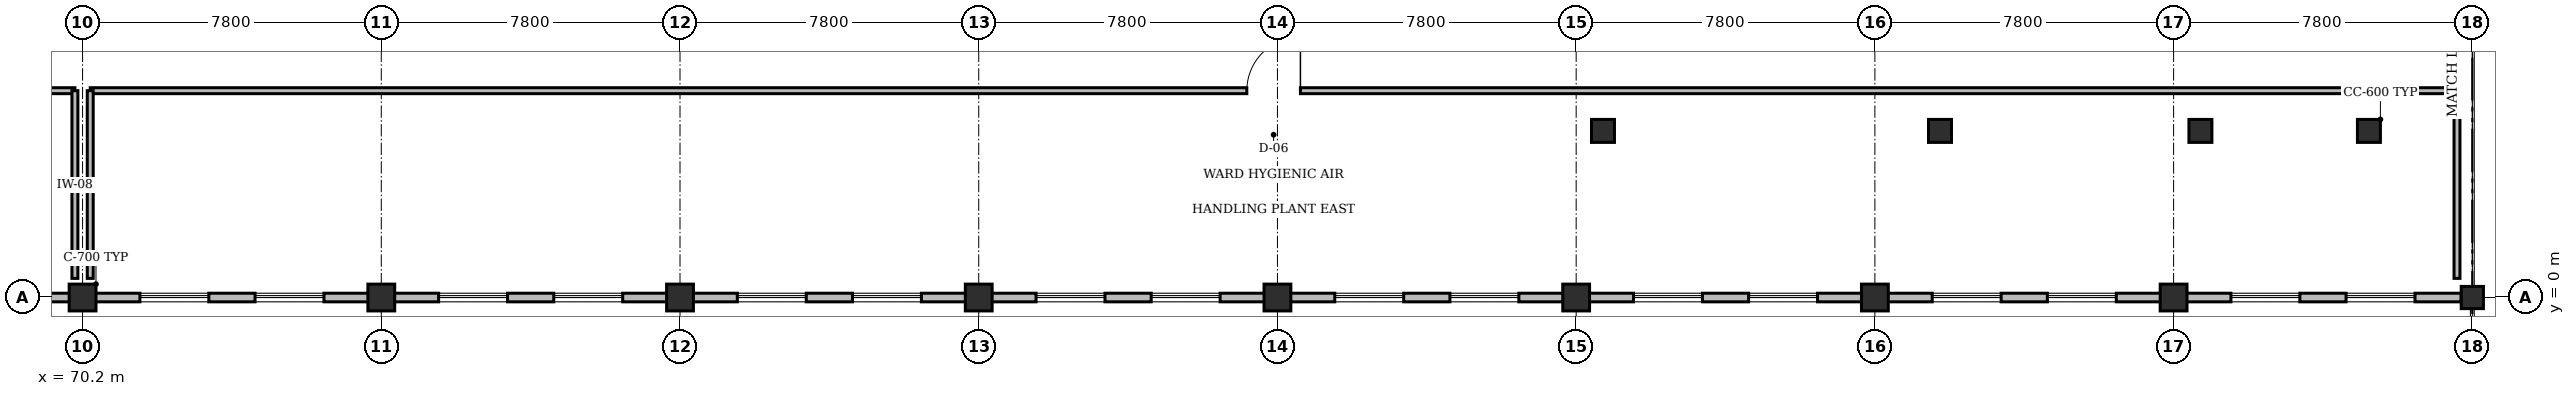
"""IFC4 building model, lengths in metres.
Left out: names, types, materials, properties, quantities, classifications, styles, units other than length and angle.
Written with IfcOpenShell. Run it as: python <this file> out.ifc"""

import sys

from ifc_helpers import new_model, si_unit, direction, frame, frame_2d, origin, origin_2d, place, context, subcontext, project, spatial, rectangle, circle, extrude, element, fill, save


model = new_model("IFC4")
c1 = context("Model", 3, precision=1e-05, world=origin(), true_north=direction((0.0, 1.0)))
c2 = subcontext(c1, "Body", "Model", "MODEL_VIEW")
j1 = project(units=[si_unit("LENGTHUNIT", "METRE"), si_unit("PLANEANGLEUNIT", "RADIAN")], contexts=[c1])
p1 = place(None, origin())
s1 = spatial("IfcSite", under=j1, at=p1, CompositionType="ELEMENT")
p2 = place(p1, origin())
s2 = spatial("IfcBuilding", under=s1, at=p2, CompositionType="ELEMENT")
p3 = place(p2, frame((0.0, 0.0, 14.4)))
s3 = spatial("IfcBuildingStorey", under=s2, at=p3, CompositionType="ELEMENT", Elevation=14.4)
for number, where, z_axis, x_axis in (
    (1, (70.2, 0.0, 0.0), (0.0, 0.0, 1.0), (1.0, 0.0, 0.0)),
    (2, (78.0, 0.0, 0.0), (0.0, 0.0, 1.0), (1.0, 0.0, 0.0)),
    (3, (85.8, 0.0, 0.0), (0.0, 0.0, 1.0), (1.0, 0.0, 0.0)),
    (4, (93.6, 0.0, 0.0), (0.0, 0.0, 1.0), (1.0, 0.0, 0.0)),
    (5, (101.4, 0.0, 0.0), (0.0, 0.0, 1.0), (1.0, 0.0, 0.0)),
    (6, (109.2, 0.0, 0.0), (0.0, 0.0, 1.0), (1.0, 0.0, 0.0)),
    (7, (117.0, 0.0, 0.0), (0.0, 0.0, 1.0), (1.0, 0.0, 0.0)),
    (8, (124.8, 0.0, 0.0), (0.0, 0.0, 1.0), (1.0, 0.0, 0.0)),
):
    element("IfcColumn", number, at=place(p3, frame(where, z_axis=z_axis, x_axis=x_axis)), inside=s3, PredefinedType="COLUMN", context=c2, shape_type="SweptSolid", body=[
        extrude(rectangle(XDim=0.7, YDim=0.7, at=origin_2d()), origin(), (0.0, 0.0, 1.0), 3.6),
    ])
p4 = place(p3, frame((132.6, 0.0, 0.0), z_axis=(0.0, 0.0, 1.0), x_axis=(1.0, 0.0, 0.0)))
e9 = element("IfcColumn", 9, at=p4, inside=s3, PredefinedType="COLUMN", context=c2, shape_type="SweptSolid", body=[
    extrude(rectangle(XDim=0.58, YDim=0.58, at=origin_2d()), origin(), (0.0, 0.0, 1.0), 3.6),
])
for number, where, z_axis, x_axis in (
    (10, (129.9, 4.35, 0.0), (0.0, 0.0, 1.0), (1.0, 0.0, 0.0)),
    (11, (125.5, 4.35, 0.0), (0.0, 0.0, 1.0), (1.0, 0.0, 0.0)),
    (12, (118.7, 4.35, 0.0), (0.0, 0.0, 1.0), (1.0, 0.0, 0.0)),
    (13, (109.9, 4.35, 0.0), (0.0, 0.0, 1.0), (1.0, 0.0, 0.0)),
):
    element("IfcColumn", number, at=place(p3, frame(where, z_axis=z_axis, x_axis=x_axis)), inside=s3, PredefinedType="PILASTER", context=c2, shape_type="SweptSolid", body=[
        extrude(circle(Radius=0.3, at=origin_2d()), origin(), (0.0, 0.0, 1.0), 3.6),
    ])
p5 = place(p3, frame((69.91, 0.0, 0.0), z_axis=(0.0, 0.0, 1.0), x_axis=(-1.0, 0.0, 0.0)))
e14 = element("IfcWall", 14, at=p5, inside=s3, PredefinedType="STANDARD", context=c2, shape_type="SweptSolid", body=[
    extrude(rectangle(XDim=7.22, YDim=0.225, at=frame_2d((3.61, 0.0))), origin(), (0.0, 0.0, 1.0), 2.205),
])
p6 = place(p5, frame((1.207, 0.0, 0.9)))
e15 = element("IfcOpeningElement", 15, at=p6, cuts=e14, PredefinedType="OPENING", context=c2, shape_type="SweptSolid", body=[
    extrude(rectangle(XDim=1.8, YDim=1.05, at=frame_2d((0.9, 0.525))), frame((0.0, 0.123, 0.0), z_axis=(0.0, -1.0, 0.0), x_axis=(1.0, 0.0, 0.0)), (0.0, 0.0, 1.0), 0.245),
])
p7 = place(p5, frame((4.213, 0.0, 0.9)))
e16 = element("IfcOpeningElement", 16, at=p7, cuts=e14, PredefinedType="OPENING", context=c2, shape_type="SweptSolid", body=[
    extrude(rectangle(XDim=1.8, YDim=1.05, at=frame_2d((0.9, 0.525))), frame((0.0, 0.123, 0.0), z_axis=(0.0, -1.0, 0.0), x_axis=(1.0, 0.0, 0.0)), (0.0, 0.0, 1.0), 0.245),
])
p8 = place(p3, frame((77.71, 0.0, 0.0), z_axis=(0.0, 0.0, 1.0), x_axis=(-1.0, 0.0, 0.0)))
e17 = element("IfcWall", 17, at=p8, inside=s3, PredefinedType="STANDARD", context=c2, shape_type="SweptSolid", body=[
    extrude(rectangle(XDim=7.22, YDim=0.225, at=frame_2d((3.61, 0.0))), origin(), (0.0, 0.0, 1.0), 2.205),
])
p9 = place(p8, frame((1.207, 0.0, 0.9)))
e18 = element("IfcOpeningElement", 18, at=p9, cuts=e17, PredefinedType="OPENING", context=c2, shape_type="SweptSolid", body=[
    extrude(rectangle(XDim=1.8, YDim=1.05, at=frame_2d((0.9, 0.525))), frame((0.0, 0.123, 0.0), z_axis=(0.0, -1.0, 0.0), x_axis=(1.0, 0.0, 0.0)), (0.0, 0.0, 1.0), 0.245),
])
p10 = place(p8, frame((4.213, 0.0, 0.9)))
e19 = element("IfcOpeningElement", 19, at=p10, cuts=e17, PredefinedType="OPENING", context=c2, shape_type="SweptSolid", body=[
    extrude(rectangle(XDim=1.8, YDim=1.05, at=frame_2d((0.9, 0.525))), frame((0.0, 0.123, 0.0), z_axis=(0.0, -1.0, 0.0), x_axis=(1.0, 0.0, 0.0)), (0.0, 0.0, 1.0), 0.245),
])
p11 = place(p3, frame((85.51, 0.0, 0.0), z_axis=(0.0, 0.0, 1.0), x_axis=(-1.0, 0.0, 0.0)))
e20 = element("IfcWall", 20, at=p11, inside=s3, PredefinedType="STANDARD", context=c2, shape_type="SweptSolid", body=[
    extrude(rectangle(XDim=7.22, YDim=0.225, at=frame_2d((3.61, 0.0))), origin(), (0.0, 0.0, 1.0), 2.205),
])
p12 = place(p11, frame((1.207, 0.0, 0.9)))
e21 = element("IfcOpeningElement", 21, at=p12, cuts=e20, PredefinedType="OPENING", context=c2, shape_type="SweptSolid", body=[
    extrude(rectangle(XDim=1.8, YDim=1.05, at=frame_2d((0.9, 0.525))), frame((0.0, 0.123, 0.0), z_axis=(0.0, -1.0, 0.0), x_axis=(1.0, 0.0, 0.0)), (0.0, 0.0, 1.0), 0.245),
])
p13 = place(p11, frame((4.213, 0.0, 0.9)))
e22 = element("IfcOpeningElement", 22, at=p13, cuts=e20, PredefinedType="OPENING", context=c2, shape_type="SweptSolid", body=[
    extrude(rectangle(XDim=1.8, YDim=1.05, at=frame_2d((0.9, 0.525))), frame((0.0, 0.123, 0.0), z_axis=(0.0, -1.0, 0.0), x_axis=(1.0, 0.0, 0.0)), (0.0, 0.0, 1.0), 0.245),
])
p14 = place(p3, frame((93.31, 0.0, 0.0), z_axis=(0.0, 0.0, 1.0), x_axis=(-1.0, 0.0, 0.0)))
e23 = element("IfcWall", 23, at=p14, inside=s3, PredefinedType="STANDARD", context=c2, shape_type="SweptSolid", body=[
    extrude(rectangle(XDim=7.22, YDim=0.225, at=frame_2d((3.61, 0.0))), origin(), (0.0, 0.0, 1.0), 2.205),
])
p15 = place(p14, frame((1.207, 0.0, 0.9)))
e24 = element("IfcOpeningElement", 24, at=p15, cuts=e23, PredefinedType="OPENING", context=c2, shape_type="SweptSolid", body=[
    extrude(rectangle(XDim=1.8, YDim=1.05, at=frame_2d((0.9, 0.525))), frame((0.0, 0.123, 0.0), z_axis=(0.0, -1.0, 0.0), x_axis=(1.0, 0.0, 0.0)), (0.0, 0.0, 1.0), 0.245),
])
p16 = place(p14, frame((4.213, 0.0, 0.9)))
e25 = element("IfcOpeningElement", 25, at=p16, cuts=e23, PredefinedType="OPENING", context=c2, shape_type="SweptSolid", body=[
    extrude(rectangle(XDim=1.8, YDim=1.05, at=frame_2d((0.9, 0.525))), frame((0.0, 0.123, 0.0), z_axis=(0.0, -1.0, 0.0), x_axis=(1.0, 0.0, 0.0)), (0.0, 0.0, 1.0), 0.245),
])
p17 = place(p3, frame((101.11, 0.0, 0.0), z_axis=(0.0, 0.0, 1.0), x_axis=(-1.0, 0.0, 0.0)))
e26 = element("IfcWall", 26, at=p17, inside=s3, PredefinedType="STANDARD", context=c2, shape_type="SweptSolid", body=[
    extrude(rectangle(XDim=7.22, YDim=0.225, at=frame_2d((3.61, 0.0))), origin(), (0.0, 0.0, 1.0), 2.205),
])
p18 = place(p17, frame((1.207, 0.0, 0.9)))
e27 = element("IfcOpeningElement", 27, at=p18, cuts=e26, PredefinedType="OPENING", context=c2, shape_type="SweptSolid", body=[
    extrude(rectangle(XDim=1.8, YDim=1.05, at=frame_2d((0.9, 0.525))), frame((0.0, 0.123, 0.0), z_axis=(0.0, -1.0, 0.0), x_axis=(1.0, 0.0, 0.0)), (0.0, 0.0, 1.0), 0.245),
])
p19 = place(p17, frame((4.213, 0.0, 0.9)))
e28 = element("IfcOpeningElement", 28, at=p19, cuts=e26, PredefinedType="OPENING", context=c2, shape_type="SweptSolid", body=[
    extrude(rectangle(XDim=1.8, YDim=1.05, at=frame_2d((0.9, 0.525))), frame((0.0, 0.123, 0.0), z_axis=(0.0, -1.0, 0.0), x_axis=(1.0, 0.0, 0.0)), (0.0, 0.0, 1.0), 0.245),
])
p20 = place(p3, frame((108.91, 0.0, 0.0), z_axis=(0.0, 0.0, 1.0), x_axis=(-1.0, 0.0, 0.0)))
e29 = element("IfcWall", 29, at=p20, inside=s3, PredefinedType="STANDARD", context=c2, shape_type="SweptSolid", body=[
    extrude(rectangle(XDim=7.22, YDim=0.225, at=frame_2d((3.61, 0.0))), origin(), (0.0, 0.0, 1.0), 2.205),
])
p21 = place(p20, frame((1.207, 0.0, 0.9)))
e30 = element("IfcOpeningElement", 30, at=p21, cuts=e29, PredefinedType="OPENING", context=c2, shape_type="SweptSolid", body=[
    extrude(rectangle(XDim=1.8, YDim=1.05, at=frame_2d((0.9, 0.525))), frame((0.0, 0.123, 0.0), z_axis=(0.0, -1.0, 0.0), x_axis=(1.0, 0.0, 0.0)), (0.0, 0.0, 1.0), 0.245),
])
p22 = place(p20, frame((4.213, 0.0, 0.9)))
e31 = element("IfcOpeningElement", 31, at=p22, cuts=e29, PredefinedType="OPENING", context=c2, shape_type="SweptSolid", body=[
    extrude(rectangle(XDim=1.8, YDim=1.05, at=frame_2d((0.9, 0.525))), frame((0.0, 0.123, 0.0), z_axis=(0.0, -1.0, 0.0), x_axis=(1.0, 0.0, 0.0)), (0.0, 0.0, 1.0), 0.245),
])
p23 = place(p3, frame((116.71, 0.0, 0.0), z_axis=(0.0, 0.0, 1.0), x_axis=(-1.0, 0.0, 0.0)))
e32 = element("IfcWall", 32, at=p23, inside=s3, PredefinedType="STANDARD", context=c2, shape_type="SweptSolid", body=[
    extrude(rectangle(XDim=7.22, YDim=0.225, at=frame_2d((3.61, 0.0))), origin(), (0.0, 0.0, 1.0), 2.205),
])
p24 = place(p23, frame((1.207, 0.0, 0.9)))
e33 = element("IfcOpeningElement", 33, at=p24, cuts=e32, PredefinedType="OPENING", context=c2, shape_type="SweptSolid", body=[
    extrude(rectangle(XDim=1.8, YDim=1.05, at=frame_2d((0.9, 0.525))), frame((0.0, 0.123, 0.0), z_axis=(0.0, -1.0, 0.0), x_axis=(1.0, 0.0, 0.0)), (0.0, 0.0, 1.0), 0.245),
])
p25 = place(p23, frame((4.213, 0.0, 0.9)))
e34 = element("IfcOpeningElement", 34, at=p25, cuts=e32, PredefinedType="OPENING", context=c2, shape_type="SweptSolid", body=[
    extrude(rectangle(XDim=1.8, YDim=1.05, at=frame_2d((0.9, 0.525))), frame((0.0, 0.123, 0.0), z_axis=(0.0, -1.0, 0.0), x_axis=(1.0, 0.0, 0.0)), (0.0, 0.0, 1.0), 0.245),
])
p26 = place(p3, frame((124.51, 0.0, 0.0), z_axis=(0.0, 0.0, 1.0), x_axis=(-1.0, 0.0, 0.0)))
e35 = element("IfcWall", 35, at=p26, inside=s3, PredefinedType="STANDARD", context=c2, shape_type="SweptSolid", body=[
    extrude(rectangle(XDim=7.22, YDim=0.225, at=frame_2d((3.61, 0.0))), origin(), (0.0, 0.0, 1.0), 2.205),
])
p27 = place(p26, frame((1.207, 0.0, 0.9)))
e36 = element("IfcOpeningElement", 36, at=p27, cuts=e35, PredefinedType="OPENING", context=c2, shape_type="SweptSolid", body=[
    extrude(rectangle(XDim=1.8, YDim=1.05, at=frame_2d((0.9, 0.525))), frame((0.0, 0.123, 0.0), z_axis=(0.0, -1.0, 0.0), x_axis=(1.0, 0.0, 0.0)), (0.0, 0.0, 1.0), 0.245),
])
p28 = place(p26, frame((4.213, 0.0, 0.9)))
e37 = element("IfcOpeningElement", 37, at=p28, cuts=e35, PredefinedType="OPENING", context=c2, shape_type="SweptSolid", body=[
    extrude(rectangle(XDim=1.8, YDim=1.05, at=frame_2d((0.9, 0.525))), frame((0.0, 0.123, 0.0), z_axis=(0.0, -1.0, 0.0), x_axis=(1.0, 0.0, 0.0)), (0.0, 0.0, 1.0), 0.245),
])
p29 = place(p3, frame((132.31, 0.0, 0.0), z_axis=(0.0, 0.0, 1.0), x_axis=(-1.0, 0.0, 0.0)))
e38 = element("IfcWall", 38, at=p29, inside=s3, PredefinedType="STANDARD", context=c2, shape_type="SweptSolid", body=[
    extrude(rectangle(XDim=7.22, YDim=0.225, at=frame_2d((3.61, 0.0))), origin(), (0.0, 0.0, 1.0), 2.205),
])
p30 = place(p29, frame((1.207, 0.0, 0.9)))
e39 = element("IfcOpeningElement", 39, at=p30, cuts=e38, PredefinedType="OPENING", context=c2, shape_type="SweptSolid", body=[
    extrude(rectangle(XDim=1.8, YDim=1.05, at=frame_2d((0.9, 0.525))), frame((0.0, 0.123, 0.0), z_axis=(0.0, -1.0, 0.0), x_axis=(1.0, 0.0, 0.0)), (0.0, 0.0, 1.0), 0.245),
])
p31 = place(p29, frame((4.213, 0.0, 0.9)))
e40 = element("IfcOpeningElement", 40, at=p31, cuts=e38, PredefinedType="OPENING", context=c2, shape_type="SweptSolid", body=[
    extrude(rectangle(XDim=1.8, YDim=1.05, at=frame_2d((0.9, 0.525))), frame((0.0, 0.123, 0.0), z_axis=(0.0, -1.0, 0.0), x_axis=(1.0, 0.0, 0.0)), (0.0, 0.0, 1.0), 0.245),
])
p32 = place(p3, frame((16.0, 5.4, 0.0), z_axis=(0.0, 0.0, 1.0), x_axis=(1.0, 0.0, 0.0)))
e41 = element("IfcWall", 41, at=p32, inside=s3, PredefinedType="PARTITIONING", context=c2, shape_type="SweptSolid", body=[
    extrude(rectangle(XDim=54.0, YDim=0.155, at=frame_2d((27.0, 0.0))), origin(), (0.0, 0.0, 1.0), 3.3),
])
p33 = place(p32, frame((26.3, 0.0, 0.0)))
e42 = element("IfcOpeningElement", 42, at=p33, cuts=e41, PredefinedType="OPENING", context=c2, shape_type="SweptSolid", body=[
    extrude(rectangle(XDim=1.4, YDim=2.2, at=frame_2d((0.7, 1.1))), frame((0.0, 0.087, 0.0), z_axis=(0.0, -1.0, 0.0), x_axis=(1.0, 0.0, 0.0)), (0.0, 0.0, 1.0), 0.175),
])
p34 = place(p3, frame((70.0, 0.5, 0.0), z_axis=(0.0, 0.0, 1.0), x_axis=(0.0, 1.0, 0.0)))
e43 = element("IfcWall", 43, at=p34, inside=s3, PredefinedType="PARTITIONING", context=c2, shape_type="SweptSolid", body=[
    extrude(rectangle(XDim=4.9, YDim=0.155, at=frame_2d((2.45, 0.0))), origin(), (0.0, 0.0, 1.0), 2.605),
])
p35 = place(p3, frame((70.4, 5.4, 0.0), z_axis=(0.0, 0.0, 1.0), x_axis=(1.0, 0.0, 0.0)))
e44 = element("IfcWall", 44, at=p35, inside=s3, PredefinedType="PARTITIONING", context=c2, shape_type="SweptSolid", body=[
    extrude(rectangle(XDim=61.8, YDim=0.155, at=frame_2d((30.9, 0.0))), origin(), (0.0, 0.0, 1.0), 3.3),
])
p36 = place(p35, frame((30.2, 0.0, 0.0)))
e45 = element("IfcOpeningElement", 45, at=p36, cuts=e44, PredefinedType="OPENING", context=c2, shape_type="SweptSolid", body=[
    extrude(rectangle(XDim=1.4, YDim=2.2, at=frame_2d((0.7, 1.1))), frame((0.0, 0.087, 0.0), z_axis=(0.0, -1.0, 0.0), x_axis=(1.0, 0.0, 0.0)), (0.0, 0.0, 1.0), 0.175),
])
p37 = place(p3, frame((70.4, 0.5, 0.0), z_axis=(0.0, 0.0, 1.0), x_axis=(0.0, 1.0, 0.0)))
e46 = element("IfcWall", 46, at=p37, inside=s3, PredefinedType="PARTITIONING", context=c2, shape_type="SweptSolid", body=[
    extrude(rectangle(XDim=4.9, YDim=0.155, at=frame_2d((2.45, 0.0))), origin(), (0.0, 0.0, 1.0), 2.605),
])
p38 = place(p3, frame((132.2, 0.5, 0.0), z_axis=(0.0, 0.0, 1.0), x_axis=(0.0, 1.0, 0.0)))
e47 = element("IfcWall", 47, at=p38, inside=s3, PredefinedType="PARTITIONING", context=c2, shape_type="SweptSolid", body=[
    extrude(rectangle(XDim=4.9, YDim=0.155, at=frame_2d((2.45, 0.0))), origin(), (0.0, 0.0, 1.0), 2.62),
])
p39 = place(p9, origin())
e48 = element("IfcWindow", 48, at=p39, inside=s3, PartitioningType="SINGLE_PANEL", PredefinedType="WINDOW", context=c2, shape_type="SweptSolid", body=[
    extrude(rectangle(XDim=1.8, YDim=1.05, at=frame_2d((0.9, 0.525))), frame((0.0, 0.03, 0.0), z_axis=(0.0, -1.0, 0.0), x_axis=(1.0, 0.0, 0.0)), (0.0, 0.0, 1.0), 0.06),
])
fill(e18, e48)
p40 = place(p10, origin())
e49 = element("IfcWindow", 49, at=p40, inside=s3, PartitioningType="SINGLE_PANEL", PredefinedType="WINDOW", context=c2, shape_type="SweptSolid", body=[
    extrude(rectangle(XDim=1.8, YDim=1.05, at=frame_2d((0.9, 0.525))), frame((0.0, 0.03, 0.0), z_axis=(0.0, -1.0, 0.0), x_axis=(1.0, 0.0, 0.0)), (0.0, 0.0, 1.0), 0.06),
])
fill(e19, e49)
p41 = place(p12, origin())
e50 = element("IfcWindow", 50, at=p41, inside=s3, PartitioningType="SINGLE_PANEL", PredefinedType="WINDOW", context=c2, shape_type="SweptSolid", body=[
    extrude(rectangle(XDim=1.8, YDim=1.05, at=frame_2d((0.9, 0.525))), frame((0.0, 0.03, 0.0), z_axis=(0.0, -1.0, 0.0), x_axis=(1.0, 0.0, 0.0)), (0.0, 0.0, 1.0), 0.06),
])
fill(e21, e50)
p42 = place(p13, origin())
e51 = element("IfcWindow", 51, at=p42, inside=s3, PartitioningType="SINGLE_PANEL", PredefinedType="WINDOW", context=c2, shape_type="SweptSolid", body=[
    extrude(rectangle(XDim=1.8, YDim=1.05, at=frame_2d((0.9, 0.525))), frame((0.0, 0.03, 0.0), z_axis=(0.0, -1.0, 0.0), x_axis=(1.0, 0.0, 0.0)), (0.0, 0.0, 1.0), 0.06),
])
fill(e22, e51)
p43 = place(p15, origin())
e52 = element("IfcWindow", 52, at=p43, inside=s3, PartitioningType="SINGLE_PANEL", PredefinedType="WINDOW", context=c2, shape_type="SweptSolid", body=[
    extrude(rectangle(XDim=1.8, YDim=1.05, at=frame_2d((0.9, 0.525))), frame((0.0, 0.03, 0.0), z_axis=(0.0, -1.0, 0.0), x_axis=(1.0, 0.0, 0.0)), (0.0, 0.0, 1.0), 0.06),
])
fill(e24, e52)
p44 = place(p16, origin())
e53 = element("IfcWindow", 53, at=p44, inside=s3, PartitioningType="SINGLE_PANEL", PredefinedType="WINDOW", context=c2, shape_type="SweptSolid", body=[
    extrude(rectangle(XDim=1.8, YDim=1.05, at=frame_2d((0.9, 0.525))), frame((0.0, 0.03, 0.0), z_axis=(0.0, -1.0, 0.0), x_axis=(1.0, 0.0, 0.0)), (0.0, 0.0, 1.0), 0.06),
])
fill(e25, e53)
p45 = place(p18, origin())
e54 = element("IfcWindow", 54, at=p45, inside=s3, PartitioningType="SINGLE_PANEL", PredefinedType="WINDOW", context=c2, shape_type="SweptSolid", body=[
    extrude(rectangle(XDim=1.8, YDim=1.05, at=frame_2d((0.9, 0.525))), frame((0.0, 0.03, 0.0), z_axis=(0.0, -1.0, 0.0), x_axis=(1.0, 0.0, 0.0)), (0.0, 0.0, 1.0), 0.06),
])
fill(e27, e54)
p46 = place(p19, origin())
e55 = element("IfcWindow", 55, at=p46, inside=s3, PartitioningType="SINGLE_PANEL", PredefinedType="WINDOW", context=c2, shape_type="SweptSolid", body=[
    extrude(rectangle(XDim=1.8, YDim=1.05, at=frame_2d((0.9, 0.525))), frame((0.0, 0.03, 0.0), z_axis=(0.0, -1.0, 0.0), x_axis=(1.0, 0.0, 0.0)), (0.0, 0.0, 1.0), 0.06),
])
fill(e28, e55)
p47 = place(p21, origin())
e56 = element("IfcWindow", 56, at=p47, inside=s3, PartitioningType="SINGLE_PANEL", PredefinedType="WINDOW", context=c2, shape_type="SweptSolid", body=[
    extrude(rectangle(XDim=1.8, YDim=1.05, at=frame_2d((0.9, 0.525))), frame((0.0, 0.03, 0.0), z_axis=(0.0, -1.0, 0.0), x_axis=(1.0, 0.0, 0.0)), (0.0, 0.0, 1.0), 0.06),
])
fill(e30, e56)
p48 = place(p22, origin())
e57 = element("IfcWindow", 57, at=p48, inside=s3, PartitioningType="SINGLE_PANEL", PredefinedType="WINDOW", context=c2, shape_type="SweptSolid", body=[
    extrude(rectangle(XDim=1.8, YDim=1.05, at=frame_2d((0.9, 0.525))), frame((0.0, 0.03, 0.0), z_axis=(0.0, -1.0, 0.0), x_axis=(1.0, 0.0, 0.0)), (0.0, 0.0, 1.0), 0.06),
])
fill(e31, e57)
p49 = place(p24, origin())
e58 = element("IfcWindow", 58, at=p49, inside=s3, PartitioningType="SINGLE_PANEL", PredefinedType="WINDOW", context=c2, shape_type="SweptSolid", body=[
    extrude(rectangle(XDim=1.8, YDim=1.05, at=frame_2d((0.9, 0.525))), frame((0.0, 0.03, 0.0), z_axis=(0.0, -1.0, 0.0), x_axis=(1.0, 0.0, 0.0)), (0.0, 0.0, 1.0), 0.06),
])
fill(e33, e58)
p50 = place(p25, origin())
e59 = element("IfcWindow", 59, at=p50, inside=s3, PartitioningType="SINGLE_PANEL", PredefinedType="WINDOW", context=c2, shape_type="SweptSolid", body=[
    extrude(rectangle(XDim=1.8, YDim=1.05, at=frame_2d((0.9, 0.525))), frame((0.0, 0.03, 0.0), z_axis=(0.0, -1.0, 0.0), x_axis=(1.0, 0.0, 0.0)), (0.0, 0.0, 1.0), 0.06),
])
fill(e34, e59)
p51 = place(p27, origin())
e60 = element("IfcWindow", 60, at=p51, inside=s3, PartitioningType="SINGLE_PANEL", PredefinedType="WINDOW", context=c2, shape_type="SweptSolid", body=[
    extrude(rectangle(XDim=1.8, YDim=1.05, at=frame_2d((0.9, 0.525))), frame((0.0, 0.03, 0.0), z_axis=(0.0, -1.0, 0.0), x_axis=(1.0, 0.0, 0.0)), (0.0, 0.0, 1.0), 0.06),
])
fill(e36, e60)
p52 = place(p28, origin())
e61 = element("IfcWindow", 61, at=p52, inside=s3, PartitioningType="SINGLE_PANEL", PredefinedType="WINDOW", context=c2, shape_type="SweptSolid", body=[
    extrude(rectangle(XDim=1.8, YDim=1.05, at=frame_2d((0.9, 0.525))), frame((0.0, 0.03, 0.0), z_axis=(0.0, -1.0, 0.0), x_axis=(1.0, 0.0, 0.0)), (0.0, 0.0, 1.0), 0.06),
])
fill(e37, e61)
p53 = place(p30, origin())
e62 = element("IfcWindow", 62, at=p53, inside=s3, PartitioningType="SINGLE_PANEL", PredefinedType="WINDOW", context=c2, shape_type="SweptSolid", body=[
    extrude(rectangle(XDim=1.8, YDim=1.05, at=frame_2d((0.9, 0.525))), frame((0.0, 0.03, 0.0), z_axis=(0.0, -1.0, 0.0), x_axis=(1.0, 0.0, 0.0)), (0.0, 0.0, 1.0), 0.06),
])
fill(e39, e62)
p54 = place(p31, origin())
e63 = element("IfcWindow", 63, at=p54, inside=s3, PartitioningType="SINGLE_PANEL", PredefinedType="WINDOW", context=c2, shape_type="SweptSolid", body=[
    extrude(rectangle(XDim=1.8, YDim=1.05, at=frame_2d((0.9, 0.525))), frame((0.0, 0.03, 0.0), z_axis=(0.0, -1.0, 0.0), x_axis=(1.0, 0.0, 0.0)), (0.0, 0.0, 1.0), 0.06),
])
fill(e40, e63)
p55 = place(p36, origin())
e64 = element("IfcDoor", 64, at=p55, inside=s3, OperationType="SINGLE_SWING_RIGHT", PredefinedType="DOOR", context=c2, shape_type="SweptSolid", body=[
    extrude(rectangle(XDim=1.4, YDim=2.2, at=frame_2d((0.7, 1.1))), frame((0.0, 0.025, 0.0), z_axis=(0.0, -1.0, 0.0), x_axis=(1.0, 0.0, 0.0)), (0.0, 0.0, 1.0), 0.05),
])
fill(e45, e64)
save(model, sys.argv[1])
